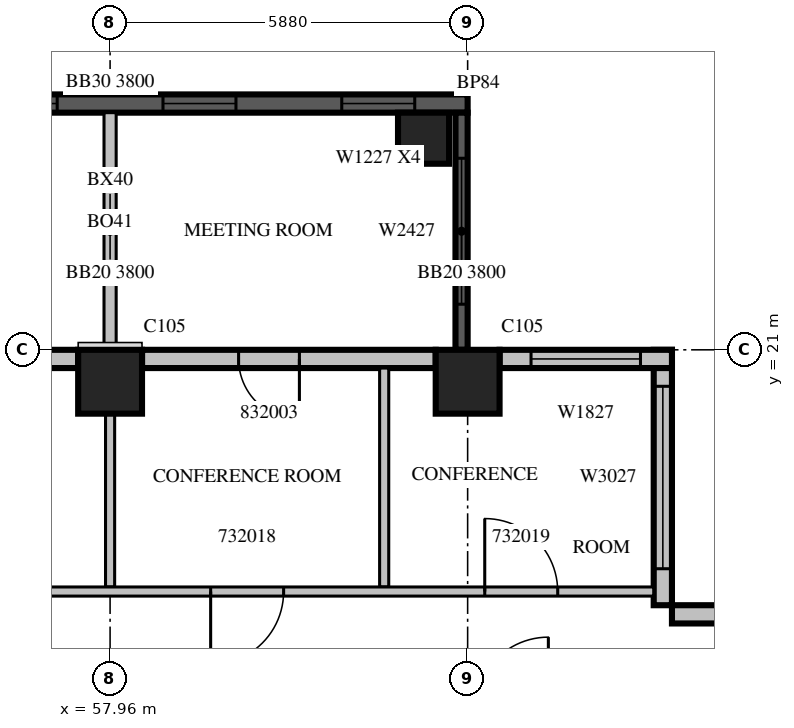
"""IFC4 building model, lengths in metres.
Left out: names, types, materials, properties, quantities, classifications, styles, units other than length and angle.
Written with IfcOpenShell. Run it as: python <this file> out.ifc"""

import sys

from ifc_helpers import new_model, si_unit, direction, frame, frame_2d, origin, origin_2d, place, context, subcontext, project, spatial, rectangle, extrude, source, transform, mapped, element, fill, save


model = new_model("IFC4")
c1 = context("Model", 3, precision=1e-05, world=origin(), true_north=direction((0.0, 1.0)))
c2 = subcontext(c1, "Body", "Model", "MODEL_VIEW")
j1 = project(units=[si_unit("LENGTHUNIT", "METRE"), si_unit("PLANEANGLEUNIT", "RADIAN")], contexts=[c1])
p1 = place(None, origin())
s1 = spatial("IfcSite", under=j1, at=p1, CompositionType="ELEMENT")
p2 = place(p1, origin())
s2 = spatial("IfcBuilding", under=s1, at=p2, CompositionType="ELEMENT")
p3 = place(p2, frame((0.0, 0.0, 145.5)))
s3 = spatial("IfcBuildingStorey", under=s2, at=p3, CompositionType="ELEMENT", Elevation=145.5)
m1 = source(origin(), c2, "Body", "SweptSolid", [
    extrude(rectangle(XDim=1.05, YDim=1.05, at=origin_2d()), origin(), (0.0, 0.0, 1.0), 4.2),
])
for number, where, z_axis, x_axis in (
    (1, (57.96, 20.475, 0.0), (0.0, 0.0, 1.0), (1.0, 0.0, 0.0)),
    (2, (63.84, 20.475, 0.0), (0.0, 0.0, 1.0), (1.0, 0.0, 0.0)),
):
    element("IfcColumn", number, at=place(p3, frame(where, z_axis=z_axis, x_axis=x_axis)), inside=s3, PredefinedType="COLUMN", context=c2, shape_type="MappedRepresentation", body=[
        mapped(m1, transform((0.0, 0.0, 0.0), scale=1.0)),
    ])
m2 = source(origin(), c2, "Body", "SweptSolid", [
    extrude(rectangle(XDim=0.84, YDim=0.84, at=origin_2d()), origin(), (0.0, 0.0, 1.0), 4.2),
])
p4 = place(p3, frame((63.115, 24.48, 0.0), z_axis=(0.0, 0.0, 1.0), x_axis=(1.0, 0.0, 0.0)))
e3 = element("IfcColumn", 3, at=p4, inside=s3, PredefinedType="COLUMN", context=c2, shape_type="MappedRepresentation", body=[
    mapped(m2, transform((0.0, 0.0, 0.0), scale=1.0)),
])
m3 = source(origin(), c2, "Body", "SweptSolid", [
    extrude(rectangle(XDim=11.76, YDim=0.3, at=frame_2d((5.88, 0.0))), origin(), (0.0, 0.0, 1.0), 3.8),
])
p5 = place(p3, frame((63.84, 25.05, 0.0), z_axis=(0.0, 0.0, 1.0), x_axis=(-1.0, 0.0, 0.0)))
e4 = element("IfcWall", 4, at=p5, inside=s3, PredefinedType="SOLIDWALL", context=c2, shape_type="MappedRepresentation", body=[
    mapped(m3, transform((0.0, 0.0, 0.0), scale=1.0)),
])
m4 = source(origin(), c2, "Body", "SweptSolid", [
    extrude(rectangle(XDim=1.2, YDim=2.7, at=frame_2d((0.6, 1.35))), frame((0.0, 0.16, 0.0), z_axis=(0.0, -1.0, 0.0), x_axis=(1.0, 0.0, 0.0)), (0.0, 0.0, 1.0), 0.32),
])
p6 = place(p5, frame((0.87, 0.0, 0.6)))
e5 = element("IfcOpeningElement", 5, at=p6, cuts=e4, PredefinedType="OPENING", context=c2, shape_type="MappedRepresentation", body=[
    mapped(m4, transform((0.0, 0.0, 0.0), scale=1.0)),
])
p7 = place(p5, frame((3.81, 0.0, 0.6)))
e6 = element("IfcOpeningElement", 6, at=p7, cuts=e4, PredefinedType="OPENING", context=c2, shape_type="MappedRepresentation", body=[
    mapped(m4, transform((0.0, 0.0, 0.0), scale=1.0)),
])
p8 = place(p5, frame((6.75, 0.0, 0.6)))
e7 = element("IfcOpeningElement", 7, at=p8, cuts=e4, PredefinedType="OPENING", context=c2, shape_type="MappedRepresentation", body=[
    mapped(m4, transform((0.0, 0.0, 0.0), scale=1.0)),
])
p9 = place(p5, frame((9.69, 0.0, 0.6)))
e8 = element("IfcOpeningElement", 8, at=p9, cuts=e4, PredefinedType="OPENING", context=c2, shape_type="MappedRepresentation", body=[
    mapped(m4, transform((0.0, 0.0, 0.0), scale=1.0)),
])
m5 = source(origin(), c2, "Body", "SweptSolid", [
    extrude(rectangle(XDim=3.9, YDim=0.2, at=frame_2d((1.95, 0.0))), origin(), (0.0, 0.0, 1.0), 3.8),
])
p10 = place(p3, frame((57.96, 21.0, 0.0), z_axis=(0.0, 0.0, 1.0), x_axis=(0.0, 1.0, 0.0)))
e9 = element("IfcWall", 9, at=p10, inside=s3, PredefinedType="SOLIDWALL", context=c2, shape_type="MappedRepresentation", body=[
    mapped(m5, transform((0.0, 0.0, 0.0), scale=1.0)),
])
m6 = source(origin(), c2, "Body", "SweptSolid", [
    extrude(rectangle(XDim=3.9, YDim=0.2, at=frame_2d((1.95, 0.0))), origin(), (0.0, 0.0, 1.0), 3.8),
])
p11 = place(p3, frame((63.74, 21.0, 0.0), z_axis=(0.0, 0.0, 1.0), x_axis=(0.0, 1.0, 0.0)))
e10 = element("IfcWall", 10, at=p11, inside=s3, PredefinedType="SOLIDWALL", context=c2, shape_type="MappedRepresentation", body=[
    mapped(m6, transform((0.0, 0.0, 0.0), scale=1.0)),
])
m7 = source(origin(), c2, "Body", "SweptSolid", [
    extrude(rectangle(XDim=2.4, YDim=2.7, at=frame_2d((1.2, 1.35))), frame((0.0, 0.11, 0.0), z_axis=(0.0, -1.0, 0.0), x_axis=(1.0, 0.0, 0.0)), (0.0, 0.0, 1.0), 0.22),
])
p12 = place(p11, frame((0.75, 0.0, 0.6)))
e11 = element("IfcOpeningElement", 11, at=p12, cuts=e10, PredefinedType="OPENING", context=c2, shape_type="MappedRepresentation", body=[
    mapped(m7, transform((0.0, 0.0, 0.0), scale=1.0)),
])
m8 = source(origin(), c2, "Body", "SweptSolid", [
    extrude(rectangle(XDim=4.2, YDim=0.3, at=frame_2d((2.1, 0.0))), origin(), (0.0, 0.0, 1.0), 3.8),
])
p13 = place(p3, frame((71.4, 16.65, 0.0), z_axis=(0.0, 0.0, 1.0), x_axis=(-1.0, 0.0, 0.0)))
e12 = element("IfcWall", 12, at=p13, inside=s3, PredefinedType="STANDARD", context=c2, shape_type="MappedRepresentation", body=[
    mapped(m8, transform((0.0, 0.0, 0.0), scale=1.0)),
])
p14 = place(p13, frame((0.66, 0.0, 0.6)))
e13 = element("IfcOpeningElement", 13, at=p14, cuts=e12, PredefinedType="OPENING", context=c2, shape_type="MappedRepresentation", body=[
    mapped(m4, transform((0.0, 0.0, 0.0), scale=1.0)),
])
p15 = place(p3, frame((67.05, 16.8, 0.0), z_axis=(0.0, 0.0, 1.0), x_axis=(0.0, 1.0, 0.0)))
e14 = element("IfcWall", 14, at=p15, inside=s3, PredefinedType="STANDARD", context=c2, shape_type="MappedRepresentation", body=[
    mapped(m8, transform((0.0, 0.0, 0.0), scale=1.0)),
])
m9 = source(origin(), c2, "Body", "SweptSolid", [
    extrude(rectangle(XDim=3.0, YDim=2.7, at=frame_2d((1.5, 1.35))), frame((0.0, 0.16, 0.0), z_axis=(0.0, -1.0, 0.0), x_axis=(1.0, 0.0, 0.0)), (0.0, 0.0, 1.0), 0.32),
])
p16 = place(p15, frame((0.6, 0.0, 0.6)))
e15 = element("IfcOpeningElement", 15, at=p16, cuts=e14, PredefinedType="OPENING", context=c2, shape_type="MappedRepresentation", body=[
    mapped(m9, transform((0.0, 0.0, 0.0), scale=1.0)),
])
m10 = source(origin(), c2, "Body", "SweptSolid", [
    extrude(rectangle(XDim=2.835, YDim=0.3, at=frame_2d((1.417, 0.0))), origin(), (0.0, 0.0, 1.0), 3.8),
])
p17 = place(p3, frame((67.2, 20.85, 0.0), z_axis=(0.0, 0.0, 1.0), x_axis=(-1.0, 0.0, 0.0)))
e16 = element("IfcWall", 16, at=p17, inside=s3, PredefinedType="STANDARD", context=c2, shape_type="MappedRepresentation", body=[
    mapped(m10, transform((0.0, 0.0, 0.0), scale=1.0)),
])
m11 = source(origin(), c2, "Body", "SweptSolid", [
    extrude(rectangle(XDim=1.8, YDim=2.7, at=frame_2d((0.9, 1.35))), frame((0.0, 0.16, 0.0), z_axis=(0.0, -1.0, 0.0), x_axis=(1.0, 0.0, 0.0)), (0.0, 0.0, 1.0), 0.32),
])
p18 = place(p17, frame((0.517, 0.0, 0.6)))
e17 = element("IfcOpeningElement", 17, at=p18, cuts=e16, PredefinedType="OPENING", context=c2, shape_type="MappedRepresentation", body=[
    mapped(m11, transform((0.0, 0.0, 0.0), scale=1.0)),
])
m12 = source(origin(), c2, "Body", "SweptSolid", [
    extrude(rectangle(XDim=4.83, YDim=0.3, at=frame_2d((2.415, 0.0))), origin(), (0.0, 0.0, 1.0), 3.8),
])
p19 = place(p3, frame((63.315, 20.85, 0.0), z_axis=(0.0, 0.0, 1.0), x_axis=(-1.0, 0.0, 0.0)))
e18 = element("IfcWall", 18, at=p19, inside=s3, PredefinedType="STANDARD", context=c2, shape_type="MappedRepresentation", body=[
    mapped(m12, transform((0.0, 0.0, 0.0), scale=1.0)),
])
m13 = source(origin(), c2, "Body", "SweptSolid", [
    extrude(rectangle(XDim=1.0, YDim=2.1, at=frame_2d((0.5, 1.05))), frame((0.0, 0.16, 0.0), z_axis=(0.0, -1.0, 0.0), x_axis=(1.0, 0.0, 0.0)), (0.0, 0.0, 1.0), 0.32),
])
p20 = place(p19, frame((2.242, 0.0, 0.0)))
e19 = element("IfcOpeningElement", 19, at=p20, cuts=e18, PredefinedType="OPENING", context=c2, shape_type="MappedRepresentation", body=[
    mapped(m13, transform((0.0, 0.0, 0.0), scale=1.0)),
])
p21 = place(p3, frame((57.435, 20.85, 0.0), z_axis=(0.0, 0.0, 1.0), x_axis=(-1.0, 0.0, 0.0)))
e20 = element("IfcWall", 20, at=p21, inside=s3, PredefinedType="STANDARD", context=c2, shape_type="MappedRepresentation", body=[
    mapped(m12, transform((0.0, 0.0, 0.0), scale=1.0)),
])
p22 = place(p21, frame((1.962, 0.0, 0.0)))
e21 = element("IfcOpeningElement", 21, at=p22, cuts=e20, PredefinedType="OPENING", context=c2, shape_type="MappedRepresentation", body=[
    mapped(m13, transform((0.0, 0.0, 0.0), scale=1.0)),
])
m14 = source(origin(), c2, "Body", "SweptSolid", [
    extrude(rectangle(XDim=3.6, YDim=0.15, at=frame_2d((1.8, 0.0))), origin(), (0.0, 0.0, 1.0), 3.8),
])
p23 = place(p3, frame((62.468, 20.7, 0.0), z_axis=(0.0, 0.0, 1.0), x_axis=(0.0, -1.0, 0.0)))
e22 = element("IfcWall", 22, at=p23, inside=s3, PredefinedType="PARTITIONING", context=c2, shape_type="MappedRepresentation", body=[
    mapped(m14, transform((0.0, 0.0, 0.0), scale=1.0)),
])
m15 = source(origin(), c2, "Body", "SweptSolid", [
    extrude(rectangle(XDim=2.851, YDim=0.15, at=frame_2d((1.425, 0.0))), origin(), (0.0, 0.0, 1.0), 3.8),
])
p24 = place(p3, frame((57.96, 17.1, 0.0), z_axis=(0.0, 0.0, 1.0), x_axis=(0.0, 1.0, 0.0)))
e23 = element("IfcWall", 23, at=p24, inside=s3, PredefinedType="PARTITIONING", context=c2, shape_type="MappedRepresentation", body=[
    mapped(m15, transform((0.0, 0.0, 0.0), scale=1.0)),
])
m16 = source(origin(), c2, "Body", "SweptSolid", [
    extrude(rectangle(XDim=37.5, YDim=0.15, at=frame_2d((18.75, 0.0))), origin(), (0.0, 0.0, 1.0), 3.3),
])
p25 = place(p3, frame((29.4, 17.025, 0.0), z_axis=(0.0, 0.0, 1.0), x_axis=(1.0, 0.0, 0.0)))
e24 = element("IfcWall", 24, at=p25, inside=s3, PredefinedType="PARTITIONING", context=c2, shape_type="MappedRepresentation", body=[
    mapped(m16, transform((0.0, 0.0, 0.0), scale=1.0)),
])
m17 = source(origin(), c2, "Body", "SweptSolid", [
    extrude(rectangle(XDim=1.0, YDim=2.1, at=frame_2d((0.5, 1.05))), frame((0.0, 0.085, 0.0), z_axis=(0.0, -1.0, 0.0), x_axis=(1.0, 0.0, 0.0)), (0.0, 0.0, 1.0), 0.17),
])
p26 = place(p25, frame((1.357, 0.0, 0.0)))
e25 = element("IfcOpeningElement", 25, at=p26, cuts=e24, PredefinedType="OPENING", context=c2, shape_type="MappedRepresentation", body=[
    mapped(m17, transform((0.0, 0.0, 0.0), scale=1.0)),
])
p27 = place(p25, frame((4.669, 0.0, 0.0)))
e26 = element("IfcOpeningElement", 26, at=p27, cuts=e24, PredefinedType="OPENING", context=c2, shape_type="MappedRepresentation", body=[
    mapped(m17, transform((0.0, 0.0, 0.0), scale=1.0)),
])
p28 = place(p25, frame((7.012, 0.0, 0.0)))
e27 = element("IfcOpeningElement", 27, at=p28, cuts=e24, PredefinedType="OPENING", context=c2, shape_type="MappedRepresentation", body=[
    mapped(m17, transform((0.0, 0.0, 0.0), scale=1.0)),
])
m18 = source(origin(), c2, "Body", "SweptSolid", [
    extrude(rectangle(XDim=1.2, YDim=2.1, at=frame_2d((0.6, 1.05))), frame((0.0, 0.085, 0.0), z_axis=(0.0, -1.0, 0.0), x_axis=(1.0, 0.0, 0.0)), (0.0, 0.0, 1.0), 0.17),
])
p29 = place(p25, frame((12.0, 0.0, 0.0)))
e28 = element("IfcOpeningElement", 28, at=p29, cuts=e24, PredefinedType="OPENING", context=c2, shape_type="MappedRepresentation", body=[
    mapped(m18, transform((0.0, 0.0, 0.0), scale=1.0)),
])
m19 = source(origin(), c2, "Body", "SweptSolid", [
    extrude(rectangle(XDim=0.9, YDim=2.1, at=frame_2d((0.45, 1.05))), frame((0.0, 0.085, 0.0), z_axis=(0.0, -1.0, 0.0), x_axis=(1.0, 0.0, 0.0)), (0.0, 0.0, 1.0), 0.17),
])
p30 = place(p25, frame((19.29, 0.0, 0.0)))
e29 = element("IfcOpeningElement", 29, at=p30, cuts=e24, PredefinedType="OPENING", context=c2, shape_type="MappedRepresentation", body=[
    mapped(m19, transform((0.0, 0.0, 0.0), scale=1.0)),
])
p31 = place(p25, frame((25.17, 0.0, 0.0)))
e30 = element("IfcOpeningElement", 30, at=p31, cuts=e24, PredefinedType="OPENING", context=c2, shape_type="MappedRepresentation", body=[
    mapped(m19, transform((0.0, 0.0, 0.0), scale=1.0)),
])
p32 = place(p25, frame((30.214, 0.0, 0.0)))
e31 = element("IfcOpeningElement", 31, at=p32, cuts=e24, PredefinedType="OPENING", context=c2, shape_type="MappedRepresentation", body=[
    mapped(m18, transform((0.0, 0.0, 0.0), scale=1.0)),
])
p33 = place(p25, frame((34.721, 0.0, 0.0)))
e32 = element("IfcOpeningElement", 32, at=p33, cuts=e24, PredefinedType="OPENING", context=c2, shape_type="MappedRepresentation", body=[
    mapped(m18, transform((0.0, 0.0, 0.0), scale=1.0)),
])
m20 = source(origin(), c2, "Body", "SweptSolid", [
    extrude(rectangle(XDim=1.2, YDim=2.7, at=frame_2d((0.6, 1.35))), frame((0.0, 0.03, 0.0), z_axis=(0.0, -1.0, 0.0), x_axis=(1.0, 0.0, 0.0)), (0.0, 0.0, 1.0), 0.06),
])
p34 = place(p6, origin())
e33 = element("IfcWindow", 33, at=p34, inside=s3, PartitioningType="SINGLE_PANEL", PredefinedType="WINDOW", context=c2, shape_type="MappedRepresentation", body=[
    mapped(m20, transform((0.0, 0.0, 0.0), scale=1.0)),
])
fill(e5, e33)
p35 = place(p7, origin())
e34 = element("IfcWindow", 34, at=p35, inside=s3, PartitioningType="SINGLE_PANEL", PredefinedType="WINDOW", context=c2, shape_type="MappedRepresentation", body=[
    mapped(m20, transform((0.0, 0.0, 0.0), scale=1.0)),
])
fill(e6, e34)
p36 = place(p8, origin())
e35 = element("IfcWindow", 35, at=p36, inside=s3, PartitioningType="SINGLE_PANEL", PredefinedType="WINDOW", context=c2, shape_type="MappedRepresentation", body=[
    mapped(m20, transform((0.0, 0.0, 0.0), scale=1.0)),
])
fill(e7, e35)
m21 = source(origin(), c2, "Body", "SweptSolid", [
    extrude(rectangle(XDim=2.4, YDim=2.7, at=frame_2d((1.2, 1.35))), frame((0.0, 0.03, 0.0), z_axis=(0.0, -1.0, 0.0), x_axis=(1.0, 0.0, 0.0)), (0.0, 0.0, 1.0), 0.06),
])
p37 = place(p12, origin())
e36 = element("IfcWindow", 36, at=p37, inside=s3, PartitioningType="SINGLE_PANEL", PredefinedType="WINDOW", context=c2, shape_type="MappedRepresentation", body=[
    mapped(m21, transform((0.0, 0.0, 0.0), scale=1.0)),
])
fill(e11, e36)
m22 = source(origin(), c2, "Body", "SweptSolid", [
    extrude(rectangle(XDim=3.0, YDim=2.7, at=frame_2d((1.5, 1.35))), frame((0.0, 0.03, 0.0), z_axis=(0.0, -1.0, 0.0), x_axis=(1.0, 0.0, 0.0)), (0.0, 0.0, 1.0), 0.06),
])
p38 = place(p16, origin())
e37 = element("IfcWindow", 37, at=p38, inside=s3, PartitioningType="SINGLE_PANEL", PredefinedType="WINDOW", context=c2, shape_type="MappedRepresentation", body=[
    mapped(m22, transform((0.0, 0.0, 0.0), scale=1.0)),
])
fill(e15, e37)
m23 = source(origin(), c2, "Body", "SweptSolid", [
    extrude(rectangle(XDim=1.8, YDim=2.7, at=frame_2d((0.9, 1.35))), frame((0.0, 0.03, 0.0), z_axis=(0.0, -1.0, 0.0), x_axis=(1.0, 0.0, 0.0)), (0.0, 0.0, 1.0), 0.06),
])
p39 = place(p18, origin())
e38 = element("IfcWindow", 38, at=p39, inside=s3, PartitioningType="SINGLE_PANEL", PredefinedType="WINDOW", context=c2, shape_type="MappedRepresentation", body=[
    mapped(m23, transform((0.0, 0.0, 0.0), scale=1.0)),
])
fill(e17, e38)
m24 = source(origin(), c2, "Body", "SweptSolid", [
    extrude(rectangle(XDim=1.2, YDim=2.1, at=frame_2d((0.6, 1.05))), frame((0.0, 0.025, 0.0), z_axis=(0.0, -1.0, 0.0), x_axis=(1.0, 0.0, 0.0)), (0.0, 0.0, 1.0), 0.05),
])
p40 = place(p32, origin())
e39 = element("IfcDoor", 39, at=p40, inside=s3, OperationType="SINGLE_SWING_RIGHT", PredefinedType="DOOR", context=c2, shape_type="MappedRepresentation", body=[
    mapped(m24, transform((0.0, 0.0, 0.0), scale=1.0)),
])
fill(e31, e39)
p41 = place(p33, origin())
e40 = element("IfcDoor", 40, at=p41, inside=s3, OperationType="SINGLE_SWING_LEFT", PredefinedType="DOOR", context=c2, shape_type="MappedRepresentation", body=[
    mapped(m24, transform((0.0, 0.0, 0.0), scale=1.0)),
])
fill(e32, e40)
m25 = source(origin(), c2, "Body", "SweptSolid", [
    extrude(rectangle(XDim=1.0, YDim=2.1, at=frame_2d((0.5, 1.05))), frame((0.0, 0.025, 0.0), z_axis=(0.0, -1.0, 0.0), x_axis=(1.0, 0.0, 0.0)), (0.0, 0.0, 1.0), 0.05),
])
p42 = place(p20, origin())
e41 = element("IfcDoor", 41, at=p42, inside=s3, OperationType="SINGLE_SWING_LEFT", PredefinedType="DOOR", context=c2, shape_type="MappedRepresentation", body=[
    mapped(m25, transform((0.0, 0.0, 0.0), scale=1.0)),
])
fill(e19, e41)
save(model, sys.argv[1])
